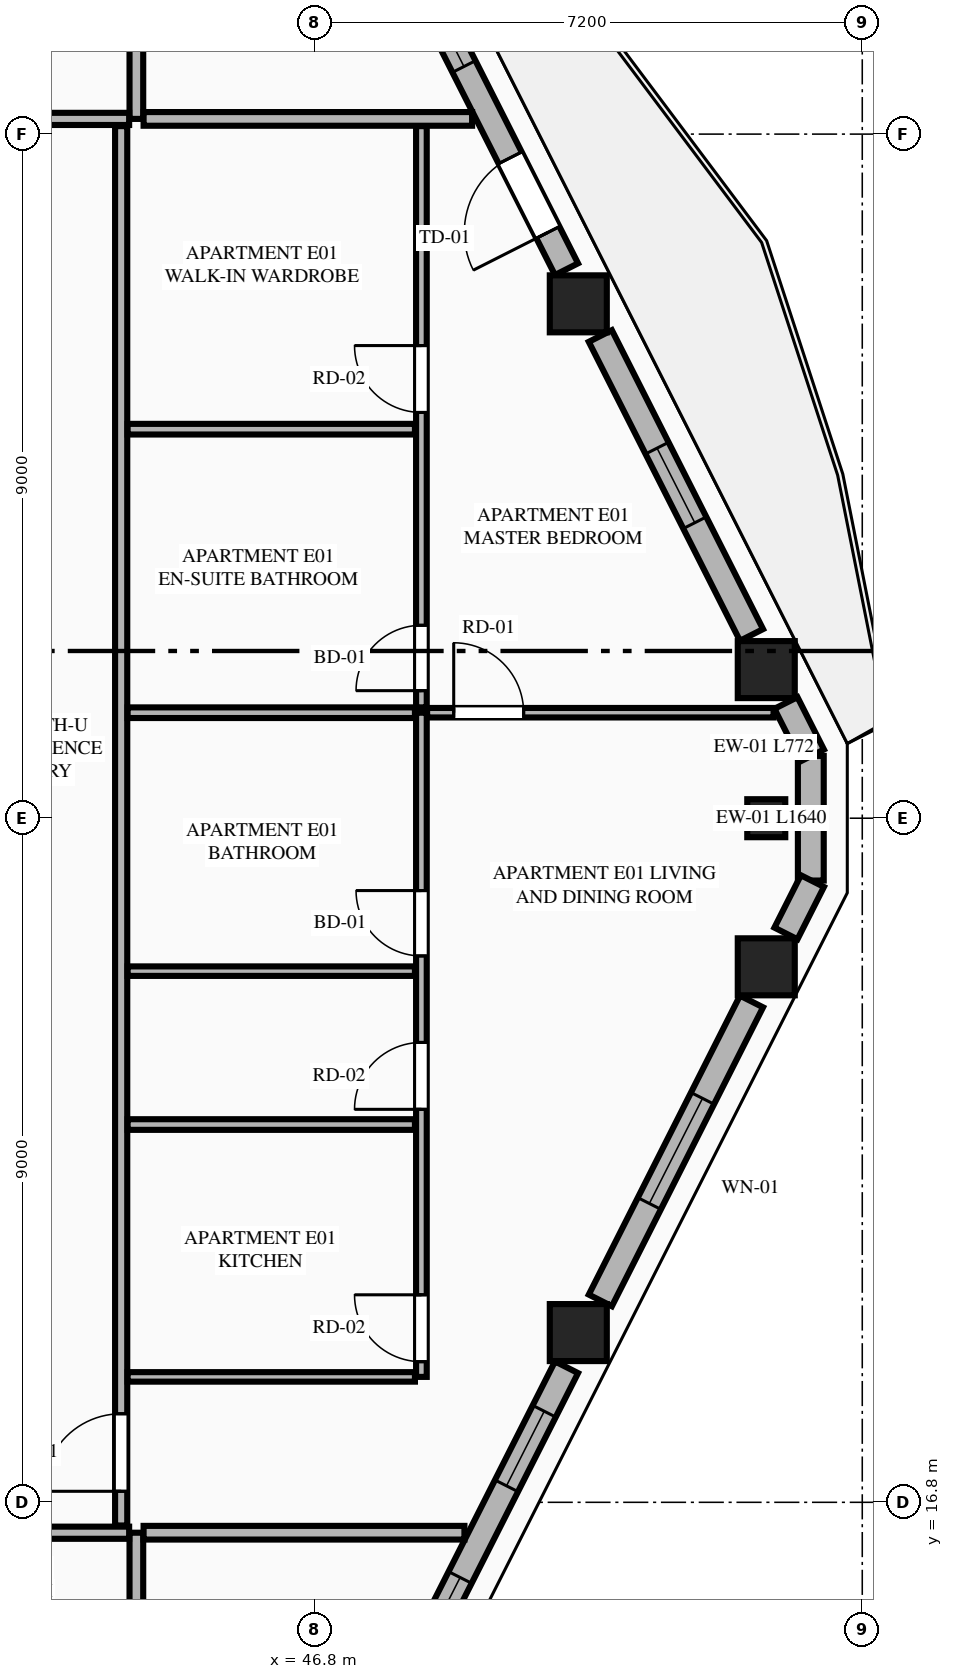
"""IFC4 building model, lengths in metres.
Left out: names, types, materials, properties, quantities, classifications, styles, units other than length and angle.
Written with IfcOpenShell. Run it as: python <this file> out.ifc"""

import sys

from ifc_helpers import new_model, si_unit, direction, frame, frame_2d, origin, origin_2d, place, context, subcontext, project, spatial, rectangle, extrude, element, fill, save


model = new_model("IFC4")
c1 = context("Model", 3, precision=1e-05, world=origin(), true_north=direction((0.0, 1.0)))
c2 = subcontext(c1, "Body", "Model", "MODEL_VIEW")
j1 = project(units=[si_unit("LENGTHUNIT", "METRE"), si_unit("PLANEANGLEUNIT", "RADIAN")], contexts=[c1])
p1 = place(None, origin())
s1 = spatial("IfcSite", under=j1, at=p1, CompositionType="ELEMENT")
p2 = place(p1, origin())
s2 = spatial("IfcBuilding", under=s1, at=p2, CompositionType="ELEMENT")
p3 = place(p2, frame((0.0, 0.0, 245.25)))
s3 = spatial("IfcBuildingStorey", under=s2, at=p3, CompositionType="ELEMENT", Elevation=245.25)
for number, where, z_axis, x_axis in (
    (1, (50.264, 19.033, 0.0), (0.0, 0.0, 1.0), (1.0, 0.0, 0.0)),
    (2, (52.737, 23.845, 0.0), (0.0, 0.0, 1.0), (1.0, 0.0, 0.0)),
    (3, (52.737, 27.755, 0.0), (0.0, 0.0, 1.0), (1.0, 0.0, 0.0)),
    (4, (50.264, 32.567, 0.0), (0.0, 0.0, 1.0), (1.0, 0.0, 0.0)),
):
    element("IfcColumn", number, at=place(p3, frame(where, z_axis=z_axis, x_axis=x_axis)), inside=s3, PredefinedType="COLUMN", context=c2, shape_type="SweptSolid", body=[
        extrude(rectangle(XDim=0.75, YDim=0.75, at=origin_2d()), origin(), (0.0, 0.0, 1.0), 3.65),
    ])
p4 = place(p3, frame((52.737, 25.8, 0.0), z_axis=(0.0, 0.0, 1.0), x_axis=(0.0, 1.0, 0.0)))
e5 = element("IfcColumn", 5, at=p4, inside=s3, PredefinedType="PILASTER", context=c2, shape_type="SweptSolid", body=[
    extrude(rectangle(XDim=0.5, YDim=0.35, at=origin_2d()), origin(), (0.0, 0.0, 1.0), 3.65),
])
p5 = place(p3, frame((53.323, 24.98, 0.0), z_axis=(0.0, 0.0, 1.0), x_axis=(0.0, 1.0, 0.0)))
e6 = element("IfcWall", 6, at=p5, inside=s3, PredefinedType="STANDARD", context=c2, shape_type="SweptSolid", body=[
    extrude(rectangle(XDim=1.64, YDim=0.34, at=frame_2d((0.82, 0.0))), origin(), (0.0, 0.0, 1.0), 3.45),
])
p6 = place(p3, frame((48.032, 14.473, 0.0), z_axis=(0.0, 0.0, 1.0), x_axis=(0.451539564999, 0.892251097641, 0.0)))
e7 = element("IfcWall", 7, at=p6, inside=s3, PredefinedType="STANDARD", context=c2, shape_type="SweptSolid", body=[
    extrude(rectangle(XDim=4.6, YDim=0.34, at=frame_2d((2.3, 0.0))), origin(), (0.0, 0.0, 1.0), 2.983),
])
p7 = place(p6, frame((0.4, 0.0, 0.75)))
e8 = element("IfcOpeningElement", 8, at=p7, cuts=e7, PredefinedType="OPENING", context=c2, shape_type="SweptSolid", body=[
    extrude(rectangle(XDim=1.1, YDim=2.0, at=frame_2d((0.55, 1.0))), frame((0.0, 0.18, 0.0), z_axis=(0.0, -1.0, 0.0), x_axis=(1.0, 0.0, 0.0)), (0.0, 0.0, 1.0), 0.36),
])
p8 = place(p6, frame((2.851, 0.0, 0.75)))
e9 = element("IfcOpeningElement", 9, at=p8, cuts=e7, PredefinedType="OPENING", context=c2, shape_type="SweptSolid", body=[
    extrude(rectangle(XDim=1.1, YDim=2.0, at=frame_2d((0.55, 1.0))), frame((0.0, 0.18, 0.0), z_axis=(0.0, -1.0, 0.0), x_axis=(1.0, 0.0, 0.0)), (0.0, 0.0, 1.0), 0.36),
])
p9 = place(p3, frame((50.554, 19.456, 0.0), z_axis=(0.0, 0.0, 1.0), x_axis=(0.45130817501, 0.892368158984, 0.0)))
e10 = element("IfcWall", 10, at=p9, inside=s3, PredefinedType="STANDARD", context=c2, shape_type="SweptSolid", body=[
    extrude(rectangle(XDim=4.407, YDim=0.34, at=frame_2d((2.204, 0.0))), origin(), (0.0, 0.0, 1.0), 2.983),
])
p10 = place(p9, frame((1.429, 0.0, 0.75)))
e11 = element("IfcOpeningElement", 11, at=p10, cuts=e10, PredefinedType="OPENING", context=c2, shape_type="SweptSolid", body=[
    extrude(rectangle(XDim=1.55, YDim=2.05, at=frame_2d((0.775, 1.025))), frame((0.0, 0.18, 0.0), z_axis=(0.0, -1.0, 0.0), x_axis=(1.0, 0.0, 0.0)), (0.0, 0.0, 1.0), 0.36),
])
for number, where, z_axis, x_axis in (
    (12, (52.996, 24.284, 0.0), (0.0, 0.0, 1.0), (0.451, 0.893, 0.0)),
    (13, (53.344, 26.627, 0.0), (0.0, 0.0, 1.0), (-0.451, 0.893, 0.0)),
):
    element("IfcWall", number, at=place(p3, frame(where, z_axis=z_axis, x_axis=x_axis)), inside=s3, PredefinedType="STANDARD", context=c2, shape_type="SweptSolid", body=[
        extrude(rectangle(XDim=0.772, YDim=0.34, at=frame_2d((0.386, 0.0))), origin(), (0.0, 0.0, 1.0), 3.45),
    ])
p11 = place(p3, frame((52.543, 28.211, 0.0), z_axis=(0.0, 0.0, 1.0), x_axis=(-0.451285866323, 0.892379441077, 0.0)))
e14 = element("IfcWall", 14, at=p11, inside=s3, PredefinedType="STANDARD", context=c2, shape_type="SweptSolid", body=[
    extrude(rectangle(XDim=4.407, YDim=0.34, at=frame_2d((2.204, 0.0))), origin(), (0.0, 0.0, 1.0), 2.983),
])
p12 = place(p11, frame((1.654, 0.0, 0.75)))
e15 = element("IfcOpeningElement", 15, at=p12, cuts=e14, PredefinedType="OPENING", context=c2, shape_type="SweptSolid", body=[
    extrude(rectangle(XDim=1.1, YDim=2.0, at=frame_2d((0.55, 1.0))), frame((0.0, 0.18, 0.0), z_axis=(0.0, -1.0, 0.0), x_axis=(1.0, 0.0, 0.0)), (0.0, 0.0, 1.0), 0.36),
])
p13 = place(p3, frame((50.109, 33.023, 0.0), z_axis=(0.0, 0.0, 1.0), x_axis=(-0.451539564999, 0.892251097641, 0.0)))
e16 = element("IfcWall", 16, at=p13, inside=s3, PredefinedType="STANDARD", context=c2, shape_type="SweptSolid", body=[
    extrude(rectangle(XDim=4.6, YDim=0.34, at=frame_2d((2.3, 0.0))), origin(), (0.0, 0.0, 1.0), 2.983),
])
p14 = place(p13, frame((0.542, 0.0, 0.0)))
e17 = element("IfcOpeningElement", 17, at=p14, cuts=e16, PredefinedType="OPENING", context=c2, shape_type="SweptSolid", body=[
    extrude(rectangle(XDim=1.1, YDim=2.25, at=frame_2d((0.55, 1.125))), frame((0.0, 0.18, 0.0), z_axis=(0.0, -1.0, 0.0), x_axis=(1.0, 0.0, 0.0)), (0.0, 0.0, 1.0), 0.36),
])
p15 = place(p13, frame((2.988, 0.0, 0.75)))
e18 = element("IfcOpeningElement", 18, at=p15, cuts=e16, PredefinedType="OPENING", context=c2, shape_type="SweptSolid", body=[
    extrude(rectangle(XDim=1.1, YDim=2.0, at=frame_2d((0.55, 1.0))), frame((0.0, 0.18, 0.0), z_axis=(0.0, -1.0, 0.0), x_axis=(1.0, 0.0, 0.0)), (0.0, 0.0, 1.0), 0.36),
])
p16 = place(p3, frame((44.45, 8.119, 0.0), z_axis=(0.0, 0.0, 1.0), x_axis=(0.0, 1.0, 0.0)))
e19 = element("IfcWall", 19, at=p16, inside=s3, PredefinedType="PARTITIONING", context=c2, shape_type="SweptSolid", body=[
    extrude(rectangle(XDim=8.281, YDim=0.18, at=frame_2d((4.141, 0.0))), origin(), (0.0, 0.0, 1.0), 3.45),
])
p17 = place(p3, frame((35.749, 16.4, 0.0), z_axis=(0.0, 0.0, 1.0), x_axis=(1.0, 0.0, 0.0)))
e20 = element("IfcWall", 20, at=p17, inside=s3, PredefinedType="PARTITIONING", context=c2, shape_type="SweptSolid", body=[
    extrude(rectangle(XDim=8.606, YDim=0.16, at=frame_2d((4.303, 0.0))), origin(), (0.0, 0.0, 1.0), 3.45),
])
p18 = place(p17, frame((0.355, 0.0, 0.0)))
e21 = element("IfcOpeningElement", 21, at=p18, cuts=e20, PredefinedType="OPENING", context=c2, shape_type="SweptSolid", body=[
    extrude(rectangle(XDim=1.02, YDim=2.25, at=frame_2d((0.51, 1.125))), frame((0.0, 0.09, 0.0), z_axis=(0.0, -1.0, 0.0), x_axis=(1.0, 0.0, 0.0)), (0.0, 0.0, 1.0), 0.18),
])
p19 = place(p3, frame((44.45, 35.0, 0.0), z_axis=(0.0, 0.0, 1.0), x_axis=(0.0, 1.0, 0.0)))
e22 = element("IfcWall", 22, at=p19, inside=s3, PredefinedType="PARTITIONING", context=c2, shape_type="SweptSolid", body=[
    extrude(rectangle(XDim=8.481, YDim=0.18, at=frame_2d((4.24, 0.0))), origin(), (0.0, 0.0, 1.0), 3.45),
])
p20 = place(p3, frame((20.445, 35.0, 0.0), z_axis=(0.0, 0.0, 1.0), x_axis=(1.0, 0.0, 0.0)))
e23 = element("IfcWall", 23, at=p20, inside=s3, PredefinedType="PARTITIONING", context=c2, shape_type="SweptSolid", body=[
    extrude(rectangle(XDim=23.91, YDim=0.16, at=frame_2d((11.955, 0.0))), origin(), (0.0, 0.0, 1.0), 3.45),
])
p21 = place(p20, frame((0.405, 0.0, 0.0)))
e24 = element("IfcOpeningElement", 24, at=p21, cuts=e23, PredefinedType="OPENING", context=c2, shape_type="SweptSolid", body=[
    extrude(rectangle(XDim=1.35, YDim=2.35, at=frame_2d((0.675, 1.175))), frame((0.0, 0.09, 0.0), z_axis=(0.0, -1.0, 0.0), x_axis=(1.0, 0.0, 0.0)), (0.0, 0.0, 1.0), 0.18),
])
p22 = place(p3, frame((44.545, 16.4, 0.0), z_axis=(0.0, 0.0, 1.0), x_axis=(1.0, 0.0, 0.0)))
e25 = element("IfcWall", 25, at=p22, inside=s3, PredefinedType="PARTITIONING", context=c2, shape_type="SweptSolid", body=[
    extrude(rectangle(XDim=4.221, YDim=0.18, at=frame_2d((2.111, 0.0))), origin(), (0.0, 0.0, 1.0), 3.45),
])
p23 = place(p3, frame((44.545, 35.0, 0.0), z_axis=(0.0, 0.0, 1.0), x_axis=(1.0, 0.0, 0.0)))
e26 = element("IfcWall", 26, at=p23, inside=s3, PredefinedType="PARTITIONING", context=c2, shape_type="SweptSolid", body=[
    extrude(rectangle(XDim=4.322, YDim=0.18, at=frame_2d((2.161, 0.0))), origin(), (0.0, 0.0, 1.0), 3.45),
])
p24 = place(p3, frame((44.25, 16.495, 0.0), z_axis=(0.0, 0.0, 1.0), x_axis=(0.0, 1.0, 0.0)))
e27 = element("IfcWall", 27, at=p24, inside=s3, PredefinedType="PARTITIONING", context=c2, shape_type="SweptSolid", body=[
    extrude(rectangle(XDim=18.41, YDim=0.16, at=frame_2d((9.205, 0.0))), origin(), (0.0, 0.0, 1.0), 3.137),
])
p25 = place(p24, frame((0.45, 0.0, 0.0)))
e28 = element("IfcOpeningElement", 28, at=p25, cuts=e27, PredefinedType="OPENING", context=c2, shape_type="SweptSolid", body=[
    extrude(rectangle(XDim=1.02, YDim=2.25, at=frame_2d((0.51, 1.125))), frame((0.0, 0.09, 0.0), z_axis=(0.0, -1.0, 0.0), x_axis=(1.0, 0.0, 0.0)), (0.0, 0.0, 1.0), 0.18),
])
p26 = place(p3, frame((44.335, 18.45, 0.0), z_axis=(0.0, 0.0, 1.0), x_axis=(1.0, 0.0, 0.0)))
e29 = element("IfcWall", 29, at=p26, inside=s3, PredefinedType="PARTITIONING", context=c2, shape_type="SweptSolid", body=[
    extrude(rectangle(XDim=3.78, YDim=0.125, at=frame_2d((1.89, 0.0))), origin(), (0.0, 0.0, 1.0), 3.45),
])
p27 = place(p3, frame((48.2, 18.45, 0.0), z_axis=(0.0, 0.0, 1.0), x_axis=(0.0, 1.0, 0.0)))
e30 = element("IfcWall", 30, at=p27, inside=s3, PredefinedType="PLUMBINGWALL", context=c2, shape_type="SweptSolid", body=[
    extrude(rectangle(XDim=8.738, YDim=0.14, at=frame_2d((4.369, 0.0))), origin(), (0.0, 0.0, 1.0), 3.45),
])
p28 = place(p27, frame((0.2, 0.0, 0.0)))
e31 = element("IfcOpeningElement", 31, at=p28, cuts=e30, PredefinedType="OPENING", context=c2, shape_type="SweptSolid", body=[
    extrude(rectangle(XDim=0.88, YDim=2.15, at=frame_2d((0.44, 1.075))), frame((0.0, 0.08, 0.0), z_axis=(0.0, -1.0, 0.0), x_axis=(1.0, 0.0, 0.0)), (0.0, 0.0, 1.0), 0.16),
])
p29 = place(p27, frame((3.52, 0.0, 0.0)))
e32 = element("IfcOpeningElement", 32, at=p29, cuts=e30, PredefinedType="OPENING", context=c2, shape_type="SweptSolid", body=[
    extrude(rectangle(XDim=0.88, YDim=2.15, at=frame_2d((0.44, 1.075))), frame((0.0, 0.08, 0.0), z_axis=(0.0, -1.0, 0.0), x_axis=(1.0, 0.0, 0.0)), (0.0, 0.0, 1.0), 0.16),
])
p30 = place(p27, frame((5.538, 0.0, 0.0)))
e33 = element("IfcOpeningElement", 33, at=p30, cuts=e30, PredefinedType="OPENING", context=c2, shape_type="SweptSolid", body=[
    extrude(rectangle(XDim=0.86, YDim=2.1, at=frame_2d((0.43, 1.05))), frame((0.0, 0.08, 0.0), z_axis=(0.0, -1.0, 0.0), x_axis=(1.0, 0.0, 0.0)), (0.0, 0.0, 1.0), 0.16),
])
p31 = place(p3, frame((48.2, 27.258, 0.0), z_axis=(0.0, 0.0, 1.0), x_axis=(0.0, 1.0, 0.0)))
e34 = element("IfcWall", 34, at=p31, inside=s3, PredefinedType="PLUMBINGWALL", context=c2, shape_type="SweptSolid", body=[
    extrude(rectangle(XDim=7.647, YDim=0.14, at=frame_2d((3.823, 0.0))), origin(), (0.0, 0.0, 1.0), 3.45),
])
p32 = place(p31, frame((0.22, 0.0, 0.0)))
e35 = element("IfcOpeningElement", 35, at=p32, cuts=e34, PredefinedType="OPENING", context=c2, shape_type="SweptSolid", body=[
    extrude(rectangle(XDim=0.86, YDim=2.1, at=frame_2d((0.43, 1.05))), frame((0.0, 0.08, 0.0), z_axis=(0.0, -1.0, 0.0), x_axis=(1.0, 0.0, 0.0)), (0.0, 0.0, 1.0), 0.16),
])
p33 = place(p31, frame((3.88, 0.0, 0.0)))
e36 = element("IfcOpeningElement", 36, at=p33, cuts=e34, PredefinedType="OPENING", context=c2, shape_type="SweptSolid", body=[
    extrude(rectangle(XDim=0.88, YDim=2.15, at=frame_2d((0.44, 1.075))), frame((0.0, 0.08, 0.0), z_axis=(0.0, -1.0, 0.0), x_axis=(1.0, 0.0, 0.0)), (0.0, 0.0, 1.0), 0.16),
])
p34 = place(p3, frame((44.335, 27.188, 0.0), z_axis=(0.0, 0.0, 1.0), x_axis=(1.0, 0.0, 0.0)))
e37 = element("IfcWall", 37, at=p34, inside=s3, PredefinedType="PLUMBINGWALL", context=c2, shape_type="SweptSolid", body=[
    extrude(rectangle(XDim=3.78, YDim=0.14, at=frame_2d((1.89, 0.0))), origin(), (0.0, 0.0, 1.0), 3.45),
])
p35 = place(p3, frame((48.275, 27.188, 0.0), z_axis=(0.0, 0.0, 1.0), x_axis=(1.0, 0.0, 0.0)))
e38 = element("IfcWall", 38, at=p35, inside=s3, PredefinedType="PARTITIONING", context=c2, shape_type="SweptSolid", body=[
    extrude(rectangle(XDim=4.558, YDim=0.125, at=frame_2d((2.279, 0.0))), origin(), (0.0, 0.0, 1.0), 3.45),
])
p36 = place(p35, frame((0.35, 0.0, 0.0)))
e39 = element("IfcOpeningElement", 39, at=p36, cuts=e38, PredefinedType="OPENING", context=c2, shape_type="SweptSolid", body=[
    extrude(rectangle(XDim=0.92, YDim=2.15, at=frame_2d((0.46, 1.075))), frame((0.0, 0.073, 0.0), z_axis=(0.0, -1.0, 0.0), x_axis=(1.0, 0.0, 0.0)), (0.0, 0.0, 1.0), 0.145),
])
p37 = place(p3, frame((44.335, 21.77, 0.0), z_axis=(0.0, 0.0, 1.0), x_axis=(1.0, 0.0, 0.0)))
e40 = element("IfcWall", 40, at=p37, inside=s3, PredefinedType="PLUMBINGWALL", context=c2, shape_type="SweptSolid", body=[
    extrude(rectangle(XDim=3.78, YDim=0.14, at=frame_2d((1.89, 0.0))), origin(), (0.0, 0.0, 1.0), 3.45),
])
p38 = place(p3, frame((44.335, 23.788, 0.0), z_axis=(0.0, 0.0, 1.0), x_axis=(1.0, 0.0, 0.0)))
e41 = element("IfcWall", 41, at=p38, inside=s3, PredefinedType="PARTITIONING", context=c2, shape_type="SweptSolid", body=[
    extrude(rectangle(XDim=3.78, YDim=0.125, at=frame_2d((1.89, 0.0))), origin(), (0.0, 0.0, 1.0), 2.907),
])
p39 = place(p3, frame((44.335, 30.918, 0.0), z_axis=(0.0, 0.0, 1.0), x_axis=(1.0, 0.0, 0.0)))
e42 = element("IfcWall", 42, at=p39, inside=s3, PredefinedType="PLUMBINGWALL", context=c2, shape_type="SweptSolid", body=[
    extrude(rectangle(XDim=3.78, YDim=0.14, at=frame_2d((1.89, 0.0))), origin(), (0.0, 0.0, 1.0), 3.45),
])
p40 = place(p7, origin())
e43 = element("IfcWindow", 43, at=p40, inside=s3, PartitioningType="SINGLE_PANEL", PredefinedType="WINDOW", context=c2, shape_type="SweptSolid", body=[
    extrude(rectangle(XDim=1.1, YDim=2.0, at=frame_2d((0.55, 1.0))), frame((0.0, 0.03, 0.0), z_axis=(0.0, -1.0, 0.0), x_axis=(1.0, 0.0, 0.0)), (0.0, 0.0, 1.0), 0.06),
])
fill(e8, e43)
p41 = place(p10, origin())
e44 = element("IfcWindow", 44, at=p41, inside=s3, PartitioningType="SINGLE_PANEL", PredefinedType="WINDOW", context=c2, shape_type="SweptSolid", body=[
    extrude(rectangle(XDim=1.55, YDim=2.05, at=frame_2d((0.775, 1.025))), frame((0.0, 0.03, 0.0), z_axis=(0.0, -1.0, 0.0), x_axis=(1.0, 0.0, 0.0)), (0.0, 0.0, 1.0), 0.06),
])
fill(e11, e44)
p42 = place(p12, origin())
e45 = element("IfcWindow", 45, at=p42, inside=s3, PartitioningType="SINGLE_PANEL", PredefinedType="WINDOW", context=c2, shape_type="SweptSolid", body=[
    extrude(rectangle(XDim=1.1, YDim=2.0, at=frame_2d((0.55, 1.0))), frame((0.0, 0.03, 0.0), z_axis=(0.0, -1.0, 0.0), x_axis=(1.0, 0.0, 0.0)), (0.0, 0.0, 1.0), 0.06),
])
fill(e15, e45)
p43 = place(p14, origin())
e46 = element("IfcDoor", 46, at=p43, inside=s3, OperationType="SINGLE_SWING_LEFT", PredefinedType="DOOR", context=c2, shape_type="SweptSolid", body=[
    extrude(rectangle(XDim=1.1, YDim=2.25, at=frame_2d((0.55, 1.125))), frame((0.0, 0.025, 0.0), z_axis=(0.0, -1.0, 0.0), x_axis=(1.0, 0.0, 0.0)), (0.0, 0.0, 1.0), 0.05),
])
fill(e17, e46)
p44 = place(p28, origin())
e47 = element("IfcDoor", 47, at=p44, inside=s3, OperationType="SINGLE_SWING_RIGHT", PredefinedType="DOOR", context=c2, shape_type="SweptSolid", body=[
    extrude(rectangle(XDim=0.88, YDim=2.15, at=frame_2d((0.44, 1.075))), frame((0.0, 0.025, 0.0), z_axis=(0.0, -1.0, 0.0), x_axis=(1.0, 0.0, 0.0)), (0.0, 0.0, 1.0), 0.05),
])
fill(e31, e47)
p45 = place(p29, origin())
e48 = element("IfcDoor", 48, at=p45, inside=s3, OperationType="SINGLE_SWING_LEFT", PredefinedType="DOOR", context=c2, shape_type="SweptSolid", body=[
    extrude(rectangle(XDim=0.88, YDim=2.15, at=frame_2d((0.44, 1.075))), frame((0.0, 0.025, 0.0), z_axis=(0.0, -1.0, 0.0), x_axis=(1.0, 0.0, 0.0)), (0.0, 0.0, 1.0), 0.05),
])
fill(e32, e48)
p46 = place(p30, origin())
e49 = element("IfcDoor", 49, at=p46, inside=s3, OperationType="SINGLE_SWING_RIGHT", PredefinedType="DOOR", context=c2, shape_type="SweptSolid", body=[
    extrude(rectangle(XDim=0.86, YDim=2.1, at=frame_2d((0.43, 1.05))), frame((0.0, 0.025, 0.0), z_axis=(0.0, -1.0, 0.0), x_axis=(1.0, 0.0, 0.0)), (0.0, 0.0, 1.0), 0.05),
])
fill(e33, e49)
p47 = place(p32, origin())
e50 = element("IfcDoor", 50, at=p47, inside=s3, OperationType="SINGLE_SWING_LEFT", PredefinedType="DOOR", context=c2, shape_type="SweptSolid", body=[
    extrude(rectangle(XDim=0.86, YDim=2.1, at=frame_2d((0.43, 1.05))), frame((0.0, 0.025, 0.0), z_axis=(0.0, -1.0, 0.0), x_axis=(1.0, 0.0, 0.0)), (0.0, 0.0, 1.0), 0.05),
])
fill(e35, e50)
p48 = place(p33, origin())
e51 = element("IfcDoor", 51, at=p48, inside=s3, OperationType="SINGLE_SWING_RIGHT", PredefinedType="DOOR", context=c2, shape_type="SweptSolid", body=[
    extrude(rectangle(XDim=0.88, YDim=2.15, at=frame_2d((0.44, 1.075))), frame((0.0, 0.025, 0.0), z_axis=(0.0, -1.0, 0.0), x_axis=(1.0, 0.0, 0.0)), (0.0, 0.0, 1.0), 0.05),
])
fill(e36, e51)
p49 = place(p25, origin())
e52 = element("IfcDoor", 52, at=p49, inside=s3, OperationType="SINGLE_SWING_LEFT", PredefinedType="DOOR", context=c2, shape_type="SweptSolid", body=[
    extrude(rectangle(XDim=1.02, YDim=2.25, at=frame_2d((0.51, 1.125))), frame((0.0, 0.025, 0.0), z_axis=(0.0, -1.0, 0.0), x_axis=(1.0, 0.0, 0.0)), (0.0, 0.0, 1.0), 0.05),
])
fill(e28, e52)
p50 = place(p36, origin())
e53 = element("IfcDoor", 53, at=p50, inside=s3, OperationType="SINGLE_SWING_LEFT", PredefinedType="DOOR", context=c2, shape_type="SweptSolid", body=[
    extrude(rectangle(XDim=0.92, YDim=2.15, at=frame_2d((0.46, 1.075))), frame((0.0, 0.025, 0.0), z_axis=(0.0, -1.0, 0.0), x_axis=(1.0, 0.0, 0.0)), (0.0, 0.0, 1.0), 0.05),
])
fill(e39, e53)
p51 = place(p8, origin())
e54 = element("IfcWindow", 54, at=p51, inside=s3, PartitioningType="SINGLE_PANEL", PredefinedType="WINDOW", context=c2, shape_type="SweptSolid", body=[
    extrude(rectangle(XDim=1.1, YDim=2.0, at=frame_2d((0.55, 1.0))), frame((0.0, 0.03, 0.0), z_axis=(0.0, -1.0, 0.0), x_axis=(1.0, 0.0, 0.0)), (0.0, 0.0, 1.0), 0.06),
])
fill(e9, e54)
p52 = place(p15, origin())
e55 = element("IfcWindow", 55, at=p52, inside=s3, PartitioningType="SINGLE_PANEL", PredefinedType="WINDOW", context=c2, shape_type="SweptSolid", body=[
    extrude(rectangle(XDim=1.1, YDim=2.0, at=frame_2d((0.55, 1.0))), frame((0.0, 0.03, 0.0), z_axis=(0.0, -1.0, 0.0), x_axis=(1.0, 0.0, 0.0)), (0.0, 0.0, 1.0), 0.06),
])
fill(e18, e55)
save(model, sys.argv[1])
